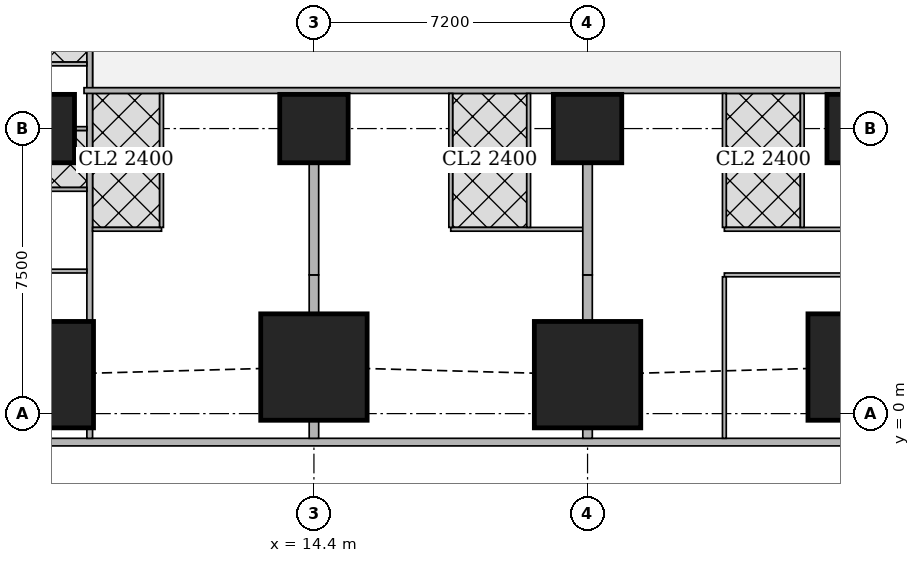
"""IFC4 building model, lengths in metres.
Left out: names, types, materials, properties, quantities, classifications, styles, units other than length and angle.
Written with IfcOpenShell. Run it as: python <this file> out.ifc"""

import sys

from ifc_helpers import new_model, si_unit, direction, frame, frame_2d, origin, origin_2d, place, context, subcontext, project, spatial, rectangle, extrude, element, fill, save


model = new_model("IFC4")
c1 = context("Model", 3, precision=1e-05, world=origin(), true_north=direction((0.0, 1.0)))
c2 = subcontext(c1, "Body", "Model", "MODEL_VIEW")
j1 = project(units=[si_unit("LENGTHUNIT", "METRE"), si_unit("PLANEANGLEUNIT", "RADIAN")], contexts=[c1])
p1 = place(None, origin())
s1 = spatial("IfcSite", under=j1, at=p1, CompositionType="ELEMENT")
p2 = place(p1, origin())
s2 = spatial("IfcBuilding", under=s1, at=p2, CompositionType="ELEMENT")
p3 = place(p2, frame((0.0, 0.0, 42.5)))
s3 = spatial("IfcBuildingStorey", under=s2, at=p3, CompositionType="ELEMENT", Elevation=42.5)
for number, where, z_axis, x_axis in (
    (1, (7.2, 1.025, 0.0), (0.0, 0.0, 1.0), (1.0, 0.0, 0.0)),
    (2, (14.4, 1.225, 0.0), (0.0, 0.0, 1.0), (1.0, 0.0, 0.0)),
    (3, (21.6, 1.025, 0.0), (0.0, 0.0, 1.0), (1.0, 0.0, 0.0)),
    (4, (28.8, 1.225, 0.0), (0.0, 0.0, 1.0), (1.0, 0.0, 0.0)),
):
    element("IfcColumn", number, at=place(p3, frame(where, z_axis=z_axis, x_axis=x_axis)), inside=s3, PredefinedType="COLUMN", context=c2, shape_type="SweptSolid", body=[
        extrude(rectangle(XDim=2.8, YDim=2.8, at=origin_2d()), origin(), (0.0, 0.0, 1.0), 3.75),
    ])
for number, where, z_axis, x_axis in (
    (5, (7.2, 7.5, 0.0), (0.0, 0.0, 1.0), (1.0, 0.0, 0.0)),
    (6, (14.4, 7.5, 0.0), (0.0, 0.0, 1.0), (1.0, 0.0, 0.0)),
    (7, (21.6, 7.5, 0.0), (0.0, 0.0, 1.0), (1.0, 0.0, 0.0)),
    (8, (28.8, 7.5, 0.0), (0.0, 0.0, 1.0), (1.0, 0.0, 0.0)),
):
    element("IfcColumn", number, at=place(p3, frame(where, z_axis=z_axis, x_axis=x_axis)), inside=s3, PredefinedType="COLUMN", context=c2, shape_type="SweptSolid", body=[
        extrude(rectangle(XDim=1.8, YDim=1.8, at=origin_2d()), origin(), (0.0, 0.0, 1.0), 3.75),
    ])
p4 = place(p3, frame((2.163, -0.75, 0.0), z_axis=(0.0, 0.0, 1.0), x_axis=(1.0, 0.0, 0.0)))
e9 = element("IfcWall", 9, at=p4, inside=s3, PredefinedType="SOLIDWALL", context=c2, shape_type="SweptSolid", body=[
    extrude(rectangle(XDim=45.628, YDim=0.2, at=frame_2d((22.814, 0.0))), origin(), (0.0, 0.0, 1.0), 3.5),
])
p5 = place(p4, frame((9.537, 0.0, 0.9)))
e10 = element("IfcOpeningElement", 10, at=p5, cuts=e9, PredefinedType="OPENING", context=c2, shape_type="SweptSolid", body=[
    extrude(rectangle(XDim=1.8, YDim=1.5, at=frame_2d((0.9, 0.75))), frame((0.0, 0.11, 0.0), z_axis=(0.0, -1.0, 0.0), x_axis=(1.0, 0.0, 0.0)), (0.0, 0.0, 1.0), 0.22),
])
p6 = place(p4, frame((13.137, 0.0, 0.9)))
e11 = element("IfcOpeningElement", 11, at=p6, cuts=e9, PredefinedType="OPENING", context=c2, shape_type="SweptSolid", body=[
    extrude(rectangle(XDim=1.8, YDim=1.5, at=frame_2d((0.9, 0.75))), frame((0.0, 0.11, 0.0), z_axis=(0.0, -1.0, 0.0), x_axis=(1.0, 0.0, 0.0)), (0.0, 0.0, 1.0), 0.22),
])
p7 = place(p4, frame((16.737, 0.0, 0.9)))
e12 = element("IfcOpeningElement", 12, at=p7, cuts=e9, PredefinedType="OPENING", context=c2, shape_type="SweptSolid", body=[
    extrude(rectangle(XDim=1.8, YDim=1.5, at=frame_2d((0.9, 0.75))), frame((0.0, 0.11, 0.0), z_axis=(0.0, -1.0, 0.0), x_axis=(1.0, 0.0, 0.0)), (0.0, 0.0, 1.0), 0.22),
])
p8 = place(p4, frame((20.337, 0.0, 0.9)))
e13 = element("IfcOpeningElement", 13, at=p8, cuts=e9, PredefinedType="OPENING", context=c2, shape_type="SweptSolid", body=[
    extrude(rectangle(XDim=1.8, YDim=1.5, at=frame_2d((0.9, 0.75))), frame((0.0, 0.11, 0.0), z_axis=(0.0, -1.0, 0.0), x_axis=(1.0, 0.0, 0.0)), (0.0, 0.0, 1.0), 0.22),
])
p9 = place(p4, frame((23.937, 0.0, 0.9)))
e14 = element("IfcOpeningElement", 14, at=p9, cuts=e9, PredefinedType="OPENING", context=c2, shape_type="SweptSolid", body=[
    extrude(rectangle(XDim=1.8, YDim=1.5, at=frame_2d((0.9, 0.75))), frame((0.0, 0.11, 0.0), z_axis=(0.0, -1.0, 0.0), x_axis=(1.0, 0.0, 0.0)), (0.0, 0.0, 1.0), 0.22),
])
p10 = place(p4, frame((27.537, 0.0, 0.9)))
e15 = element("IfcOpeningElement", 15, at=p10, cuts=e9, PredefinedType="OPENING", context=c2, shape_type="SweptSolid", body=[
    extrude(rectangle(XDim=1.8, YDim=1.5, at=frame_2d((0.9, 0.75))), frame((0.0, 0.11, 0.0), z_axis=(0.0, -1.0, 0.0), x_axis=(1.0, 0.0, 0.0)), (0.0, 0.0, 1.0), 0.22),
])
p11 = place(p4, frame((31.137, 0.0, 0.9)))
e16 = element("IfcOpeningElement", 16, at=p11, cuts=e9, PredefinedType="OPENING", context=c2, shape_type="SweptSolid", body=[
    extrude(rectangle(XDim=1.8, YDim=1.5, at=frame_2d((0.9, 0.75))), frame((0.0, 0.11, 0.0), z_axis=(0.0, -1.0, 0.0), x_axis=(1.0, 0.0, 0.0)), (0.0, 0.0, 1.0), 0.22),
])
p12 = place(p4, frame((34.737, 0.0, 0.9)))
e17 = element("IfcOpeningElement", 17, at=p12, cuts=e9, PredefinedType="OPENING", context=c2, shape_type="SweptSolid", body=[
    extrude(rectangle(XDim=1.8, YDim=1.5, at=frame_2d((0.9, 0.75))), frame((0.0, 0.11, 0.0), z_axis=(0.0, -1.0, 0.0), x_axis=(1.0, 0.0, 0.0)), (0.0, 0.0, 1.0), 0.22),
])
p13 = place(p3, frame((8.5, -0.65, 0.0), z_axis=(0.0, 0.0, 1.0), x_axis=(0.0, 1.0, 0.0)))
e18 = element("IfcWall", 18, at=p13, inside=s3, PredefinedType="SOLIDWALL", context=c2, shape_type="SweptSolid", body=[
    extrude(rectangle(XDim=0.274, YDim=0.15, at=frame_2d((0.137, 0.0))), origin(), (0.0, 0.0, 1.0), 3.5),
])
p14 = place(p3, frame((8.5, 2.426, 0.0), z_axis=(0.0, 0.0, 1.0), x_axis=(0.0, 1.0, 0.0)))
e19 = element("IfcWall", 19, at=p14, inside=s3, PredefinedType="SOLIDWALL", context=c2, shape_type="SweptSolid", body=[
    extrude(rectangle(XDim=40.173, YDim=0.15, at=frame_2d((20.086, 0.0))), origin(), (0.0, 0.0, 1.0), 3.5),
])
p15 = place(p14, frame((9.986, 0.0, 0.0)))
e20 = element("IfcOpeningElement", 20, at=p15, cuts=e19, PredefinedType="OPENING", context=c2, shape_type="SweptSolid", body=[
    extrude(rectangle(XDim=1.0, YDim=2.1, at=frame_2d((0.5, 1.05))), frame((0.0, 0.085, 0.0), z_axis=(0.0, -1.0, 0.0), x_axis=(1.0, 0.0, 0.0)), (0.0, 0.0, 1.0), 0.17),
])
p16 = place(p14, frame((14.161, 0.0, 0.0)))
e21 = element("IfcOpeningElement", 21, at=p16, cuts=e19, PredefinedType="OPENING", context=c2, shape_type="SweptSolid", body=[
    extrude(rectangle(XDim=1.0, YDim=2.1, at=frame_2d((0.5, 1.05))), frame((0.0, 0.085, 0.0), z_axis=(0.0, -1.0, 0.0), x_axis=(1.0, 0.0, 0.0)), (0.0, 0.0, 1.0), 0.17),
])
p17 = place(p14, frame((21.662, 0.0, 0.0)))
e22 = element("IfcOpeningElement", 22, at=p17, cuts=e19, PredefinedType="OPENING", context=c2, shape_type="SweptSolid", body=[
    extrude(rectangle(XDim=1.0, YDim=2.1, at=frame_2d((0.5, 1.05))), frame((0.0, 0.085, 0.0), z_axis=(0.0, -1.0, 0.0), x_axis=(1.0, 0.0, 0.0)), (0.0, 0.0, 1.0), 0.17),
])
p18 = place(p14, frame((29.161, 0.0, 0.0)))
e23 = element("IfcOpeningElement", 23, at=p18, cuts=e19, PredefinedType="OPENING", context=c2, shape_type="SweptSolid", body=[
    extrude(rectangle(XDim=1.0, YDim=2.1, at=frame_2d((0.5, 1.05))), frame((0.0, 0.085, 0.0), z_axis=(0.0, -1.0, 0.0), x_axis=(1.0, 0.0, 0.0)), (0.0, 0.0, 1.0), 0.17),
])
p19 = place(p3, frame((40.054, 8.5, 0.0), z_axis=(0.0, 0.0, 1.0), x_axis=(-1.0, 0.0, 0.0)))
e24 = element("IfcWall", 24, at=p19, inside=s3, PredefinedType="SOLIDWALL", context=c2, shape_type="SweptSolid", body=[
    extrude(rectangle(XDim=31.704, YDim=0.15, at=frame_2d((15.852, 0.0))), origin(), (0.0, 0.0, 1.0), 3.5),
])
p20 = place(p19, frame((27.321, 0.0, 0.0)))
e25 = element("IfcOpeningElement", 25, at=p20, cuts=e24, PredefinedType="OPENING", context=c2, shape_type="SweptSolid", body=[
    extrude(rectangle(XDim=1.0, YDim=2.1, at=frame_2d((0.5, 1.05))), frame((0.0, 0.085, 0.0), z_axis=(0.0, -1.0, 0.0), x_axis=(1.0, 0.0, 0.0)), (0.0, 0.0, 1.0), 0.17),
])
p21 = place(p19, frame((23.054, 0.0, 0.0)))
e26 = element("IfcOpeningElement", 26, at=p21, cuts=e24, PredefinedType="OPENING", context=c2, shape_type="SweptSolid", body=[
    extrude(rectangle(XDim=1.0, YDim=2.1, at=frame_2d((0.5, 1.05))), frame((0.0, 0.085, 0.0), z_axis=(0.0, -1.0, 0.0), x_axis=(1.0, 0.0, 0.0)), (0.0, 0.0, 1.0), 0.17),
])
p22 = place(p19, frame((15.854, 0.0, 0.0)))
e27 = element("IfcOpeningElement", 27, at=p22, cuts=e24, PredefinedType="OPENING", context=c2, shape_type="SweptSolid", body=[
    extrude(rectangle(XDim=1.0, YDim=2.1, at=frame_2d((0.5, 1.05))), frame((0.0, 0.085, 0.0), z_axis=(0.0, -1.0, 0.0), x_axis=(1.0, 0.0, 0.0)), (0.0, 0.0, 1.0), 0.17),
])
p23 = place(p19, frame((8.654, 0.0, 0.0)))
e28 = element("IfcOpeningElement", 28, at=p23, cuts=e24, PredefinedType="OPENING", context=c2, shape_type="SweptSolid", body=[
    extrude(rectangle(XDim=1.0, YDim=2.1, at=frame_2d((0.5, 1.05))), frame((0.0, 0.085, 0.0), z_axis=(0.0, -1.0, 0.0), x_axis=(1.0, 0.0, 0.0)), (0.0, 0.0, 1.0), 0.17),
])
p24 = place(p19, frame((0.15, 0.0, 0.0)))
e29 = element("IfcOpeningElement", 29, at=p24, cuts=e24, PredefinedType="OPENING", context=c2, shape_type="SweptSolid", body=[
    extrude(rectangle(XDim=1.0, YDim=2.1, at=frame_2d((0.5, 1.05))), frame((0.0, 0.085, 0.0), z_axis=(0.0, -1.0, 0.0), x_axis=(1.0, 0.0, 0.0)), (0.0, 0.0, 1.0), 0.17),
])
p25 = place(p3, frame((4.9, 3.75, 0.0), z_axis=(0.0, 0.0, 1.0), x_axis=(1.0, 0.0, 0.0)))
e30 = element("IfcWall", 30, at=p25, inside=s3, PredefinedType="PARTITIONING", context=c2, shape_type="SweptSolid", body=[
    extrude(rectangle(XDim=3.525, YDim=0.1, at=frame_2d((1.763, 0.0))), origin(), (0.0, 0.0, 1.0), 3.5),
])
p26 = place(p3, frame((8.101, 7.5, 0.0), z_axis=(0.0, 0.0, 1.0), x_axis=(1.0, 0.0, 0.0)))
e31 = element("IfcWall", 31, at=p26, inside=s3, PredefinedType="PARTITIONING", context=c2, shape_type="SweptSolid", body=[
    extrude(rectangle(XDim=0.324, YDim=0.1, at=frame_2d((0.162, 0.0))), origin(), (0.0, 0.0, 1.0), 3.5),
])
for number, where, z_axis, x_axis in (
    (32, (4.9, 9.2, 0.0), (0.0, 0.0, 1.0), (1.0, 0.0, 0.0)),
    (33, (4.9, 5.9, 0.0), (0.0, 0.0, 1.0), (1.0, 0.0, 0.0)),
):
    element("IfcWall", number, at=place(p3, frame(where, z_axis=z_axis, x_axis=x_axis)), inside=s3, PredefinedType="PARTITIONING", context=c2, shape_type="SweptSolid", body=[
        extrude(rectangle(XDim=3.525, YDim=0.1, at=frame_2d((1.763, 0.0))), origin(), (0.0, 0.0, 1.0), 3.5),
    ])
p27 = place(p3, frame((10.39, 4.85, 0.0), z_axis=(0.0, 0.0, 1.0), x_axis=(-1.0, 0.0, 0.0)))
e34 = element("IfcWall", 34, at=p27, inside=s3, PredefinedType="PARTITIONING", context=c2, shape_type="SweptSolid", body=[
    extrude(rectangle(XDim=1.815, YDim=0.1, at=frame_2d((0.907, 0.0))), origin(), (0.0, 0.0, 1.0), 3.5),
])
p28 = place(p27, frame((0.49, 0.0, 0.0)))
e35 = element("IfcOpeningElement", 35, at=p28, cuts=e34, PredefinedType="OPENING", context=c2, shape_type="SweptSolid", body=[
    extrude(rectangle(XDim=0.9, YDim=2.1, at=frame_2d((0.45, 1.05))), frame((0.0, 0.06, 0.0), z_axis=(0.0, -1.0, 0.0), x_axis=(1.0, 0.0, 0.0)), (0.0, 0.0, 1.0), 0.12),
])
p29 = place(p3, frame((10.39, 4.9, 0.0), z_axis=(0.0, 0.0, 1.0), x_axis=(0.0, 1.0, 0.0)))
e36 = element("IfcWall", 36, at=p29, inside=s3, PredefinedType="PARTITIONING", context=c2, shape_type="SweptSolid", body=[
    extrude(rectangle(XDim=3.525, YDim=0.1, at=frame_2d((1.763, 0.0))), origin(), (0.0, 0.0, 1.0), 3.5),
])
p30 = place(p3, frame((21.475, 4.85, 0.0), z_axis=(0.0, 0.0, 1.0), x_axis=(-1.0, 0.0, 0.0)))
e37 = element("IfcWall", 37, at=p30, inside=s3, PredefinedType="PARTITIONING", context=c2, shape_type="SweptSolid", body=[
    extrude(rectangle(XDim=3.475, YDim=0.1, at=frame_2d((1.738, 0.0))), origin(), (0.0, 0.0, 1.0), 3.5),
])
p31 = place(p30, frame((2.0, 0.0, 0.0)))
e38 = element("IfcOpeningElement", 38, at=p31, cuts=e37, PredefinedType="OPENING", context=c2, shape_type="SweptSolid", body=[
    extrude(rectangle(XDim=0.9, YDim=2.1, at=frame_2d((0.45, 1.05))), frame((0.0, 0.06, 0.0), z_axis=(0.0, -1.0, 0.0), x_axis=(1.0, 0.0, 0.0)), (0.0, 0.0, 1.0), 0.12),
])
p32 = place(p30, frame((0.2, 0.0, 0.0)))
e39 = element("IfcOpeningElement", 39, at=p32, cuts=e37, PredefinedType="OPENING", context=c2, shape_type="SweptSolid", body=[
    extrude(rectangle(XDim=0.9, YDim=2.1, at=frame_2d((0.45, 1.05))), frame((0.0, 0.06, 0.0), z_axis=(0.0, -1.0, 0.0), x_axis=(1.0, 0.0, 0.0)), (0.0, 0.0, 1.0), 0.12),
])
for number, where, z_axis, x_axis in (
    (40, (18.0, 4.9, 0.0), (0.0, 0.0, 1.0), (0.0, 1.0, 0.0)),
    (41, (20.05, 4.9, 0.0), (0.0, 0.0, 1.0), (0.0, 1.0, 0.0)),
):
    element("IfcWall", number, at=place(p3, frame(where, z_axis=z_axis, x_axis=x_axis)), inside=s3, PredefinedType="PARTITIONING", context=c2, shape_type="SweptSolid", body=[
        extrude(rectangle(XDim=3.525, YDim=0.1, at=frame_2d((1.763, 0.0))), origin(), (0.0, 0.0, 1.0), 3.5),
    ])
p33 = place(p3, frame((14.4, -0.65, 0.0), z_axis=(0.0, 0.0, 1.0), x_axis=(0.0, 1.0, 0.0)))
e42 = element("IfcWall", 42, at=p33, inside=s3, PredefinedType="SOLIDWALL", context=c2, shape_type="SweptSolid", body=[
    extrude(rectangle(XDim=0.474, YDim=0.25, at=frame_2d((0.237, 0.0))), origin(), (0.0, 0.0, 1.0), 3.5),
])
p34 = place(p3, frame((14.4, 2.626, 0.0), z_axis=(0.0, 0.0, 1.0), x_axis=(0.0, 1.0, 0.0)))
e43 = element("IfcWall", 43, at=p34, inside=s3, PredefinedType="SOLIDWALL", context=c2, shape_type="SweptSolid", body=[
    extrude(rectangle(XDim=1.024, YDim=0.25, at=frame_2d((0.512, 0.0))), origin(), (0.0, 0.0, 1.0), 3.5),
])
p35 = place(p3, frame((14.4, 3.65, 0.0), z_axis=(0.0, 0.0, 1.0), x_axis=(0.0, 1.0, 0.0)))
e44 = element("IfcWall", 44, at=p35, inside=s3, PredefinedType="SOLIDWALL", context=c2, shape_type="SweptSolid", body=[
    extrude(rectangle(XDim=2.949, YDim=0.25, at=frame_2d((1.475, 0.0))), origin(), (0.0, 0.0, 1.0), 3.5),
])
p36 = place(p3, frame((28.675, 3.65, 0.0), z_axis=(0.0, 0.0, 1.0), x_axis=(-1.0, 0.0, 0.0)))
e45 = element("IfcWall", 45, at=p36, inside=s3, PredefinedType="PARTITIONING", context=c2, shape_type="SweptSolid", body=[
    extrude(rectangle(XDim=3.475, YDim=0.1, at=frame_2d((1.738, 0.0))), origin(), (0.0, 0.0, 1.0), 3.5),
])
p37 = place(p36, frame((2.375, 0.0, 0.0)))
e46 = element("IfcOpeningElement", 46, at=p37, cuts=e45, PredefinedType="OPENING", context=c2, shape_type="SweptSolid", body=[
    extrude(rectangle(XDim=0.9, YDim=2.1, at=frame_2d((0.45, 1.05))), frame((0.0, 0.06, 0.0), z_axis=(0.0, -1.0, 0.0), x_axis=(1.0, 0.0, 0.0)), (0.0, 0.0, 1.0), 0.12),
])
p38 = place(p3, frame((28.675, 4.85, 0.0), z_axis=(0.0, 0.0, 1.0), x_axis=(-1.0, 0.0, 0.0)))
e47 = element("IfcWall", 47, at=p38, inside=s3, PredefinedType="PARTITIONING", context=c2, shape_type="SweptSolid", body=[
    extrude(rectangle(XDim=3.475, YDim=0.1, at=frame_2d((1.738, 0.0))), origin(), (0.0, 0.0, 1.0), 3.5),
])
p39 = place(p38, frame((2.0, 0.0, 0.0)))
e48 = element("IfcOpeningElement", 48, at=p39, cuts=e47, PredefinedType="OPENING", context=c2, shape_type="SweptSolid", body=[
    extrude(rectangle(XDim=0.9, YDim=2.1, at=frame_2d((0.45, 1.05))), frame((0.0, 0.06, 0.0), z_axis=(0.0, -1.0, 0.0), x_axis=(1.0, 0.0, 0.0)), (0.0, 0.0, 1.0), 0.12),
])
p40 = place(p38, frame((0.2, 0.0, 0.0)))
e49 = element("IfcOpeningElement", 49, at=p40, cuts=e47, PredefinedType="OPENING", context=c2, shape_type="SweptSolid", body=[
    extrude(rectangle(XDim=0.9, YDim=2.1, at=frame_2d((0.45, 1.05))), frame((0.0, 0.06, 0.0), z_axis=(0.0, -1.0, 0.0), x_axis=(1.0, 0.0, 0.0)), (0.0, 0.0, 1.0), 0.12),
])
p41 = place(p3, frame((25.2, -0.65, 0.0), z_axis=(0.0, 0.0, 1.0), x_axis=(0.0, 1.0, 0.0)))
e50 = element("IfcWall", 50, at=p41, inside=s3, PredefinedType="PARTITIONING", context=c2, shape_type="SweptSolid", body=[
    extrude(rectangle(XDim=4.25, YDim=0.1, at=frame_2d((2.125, 0.0))), origin(), (0.0, 0.0, 1.0), 2.05),
])
for number, where, z_axis, x_axis in (
    (51, (25.2, 4.9, 0.0), (0.0, 0.0, 1.0), (0.0, 1.0, 0.0)),
    (52, (27.25, 4.9, 0.0), (0.0, 0.0, 1.0), (0.0, 1.0, 0.0)),
):
    element("IfcWall", number, at=place(p3, frame(where, z_axis=z_axis, x_axis=x_axis)), inside=s3, PredefinedType="PARTITIONING", context=c2, shape_type="SweptSolid", body=[
        extrude(rectangle(XDim=3.525, YDim=0.1, at=frame_2d((1.763, 0.0))), origin(), (0.0, 0.0, 1.0), 3.5),
    ])
p42 = place(p3, frame((21.6, -0.65, 0.0), z_axis=(0.0, 0.0, 1.0), x_axis=(0.0, 1.0, 0.0)))
e53 = element("IfcWall", 53, at=p42, inside=s3, PredefinedType="SOLIDWALL", context=c2, shape_type="SweptSolid", body=[
    extrude(rectangle(XDim=0.274, YDim=0.25, at=frame_2d((0.137, 0.0))), origin(), (0.0, 0.0, 1.0), 3.5),
])
p43 = place(p3, frame((21.6, 2.426, 0.0), z_axis=(0.0, 0.0, 1.0), x_axis=(0.0, 1.0, 0.0)))
e54 = element("IfcWall", 54, at=p43, inside=s3, PredefinedType="SOLIDWALL", context=c2, shape_type="SweptSolid", body=[
    extrude(rectangle(XDim=1.224, YDim=0.25, at=frame_2d((0.612, 0.0))), origin(), (0.0, 0.0, 1.0), 3.5),
])
p44 = place(p3, frame((21.6, 3.65, 0.0), z_axis=(0.0, 0.0, 1.0), x_axis=(0.0, 1.0, 0.0)))
e55 = element("IfcWall", 55, at=p44, inside=s3, PredefinedType="SOLIDWALL", context=c2, shape_type="SweptSolid", body=[
    extrude(rectangle(XDim=2.949, YDim=0.25, at=frame_2d((1.475, 0.0))), origin(), (0.0, 0.0, 1.0), 3.5),
])
p45 = place(p5, origin())
e56 = element("IfcWindow", 56, at=p45, inside=s3, PartitioningType="SINGLE_PANEL", PredefinedType="WINDOW", context=c2, shape_type="SweptSolid", body=[
    extrude(rectangle(XDim=1.8, YDim=1.5, at=frame_2d((0.9, 0.75))), frame((0.0, 0.03, 0.0), z_axis=(0.0, -1.0, 0.0), x_axis=(1.0, 0.0, 0.0)), (0.0, 0.0, 1.0), 0.06),
])
fill(e10, e56)
p46 = place(p6, origin())
e57 = element("IfcWindow", 57, at=p46, inside=s3, PartitioningType="SINGLE_PANEL", PredefinedType="WINDOW", context=c2, shape_type="SweptSolid", body=[
    extrude(rectangle(XDim=1.8, YDim=1.5, at=frame_2d((0.9, 0.75))), frame((0.0, 0.03, 0.0), z_axis=(0.0, -1.0, 0.0), x_axis=(1.0, 0.0, 0.0)), (0.0, 0.0, 1.0), 0.06),
])
fill(e11, e57)
p47 = place(p7, origin())
e58 = element("IfcWindow", 58, at=p47, inside=s3, PartitioningType="SINGLE_PANEL", PredefinedType="WINDOW", context=c2, shape_type="SweptSolid", body=[
    extrude(rectangle(XDim=1.8, YDim=1.5, at=frame_2d((0.9, 0.75))), frame((0.0, 0.03, 0.0), z_axis=(0.0, -1.0, 0.0), x_axis=(1.0, 0.0, 0.0)), (0.0, 0.0, 1.0), 0.06),
])
fill(e12, e58)
p48 = place(p8, origin())
e59 = element("IfcWindow", 59, at=p48, inside=s3, PartitioningType="SINGLE_PANEL", PredefinedType="WINDOW", context=c2, shape_type="SweptSolid", body=[
    extrude(rectangle(XDim=1.8, YDim=1.5, at=frame_2d((0.9, 0.75))), frame((0.0, 0.03, 0.0), z_axis=(0.0, -1.0, 0.0), x_axis=(1.0, 0.0, 0.0)), (0.0, 0.0, 1.0), 0.06),
])
fill(e13, e59)
p49 = place(p9, origin())
e60 = element("IfcWindow", 60, at=p49, inside=s3, PartitioningType="SINGLE_PANEL", PredefinedType="WINDOW", context=c2, shape_type="SweptSolid", body=[
    extrude(rectangle(XDim=1.8, YDim=1.5, at=frame_2d((0.9, 0.75))), frame((0.0, 0.03, 0.0), z_axis=(0.0, -1.0, 0.0), x_axis=(1.0, 0.0, 0.0)), (0.0, 0.0, 1.0), 0.06),
])
fill(e14, e60)
p50 = place(p28, origin())
e61 = element("IfcDoor", 61, at=p50, inside=s3, OperationType="SINGLE_SWING_LEFT", PredefinedType="DOOR", context=c2, shape_type="SweptSolid", body=[
    extrude(rectangle(XDim=0.9, YDim=2.1, at=frame_2d((0.45, 1.05))), frame((0.0, 0.025, 0.0), z_axis=(0.0, -1.0, 0.0), x_axis=(1.0, 0.0, 0.0)), (0.0, 0.0, 1.0), 0.05),
])
fill(e35, e61)
p51 = place(p20, origin())
e62 = element("IfcDoor", 62, at=p51, inside=s3, OperationType="SINGLE_SWING_LEFT", PredefinedType="DOOR", context=c2, shape_type="SweptSolid", body=[
    extrude(rectangle(XDim=1.0, YDim=2.1, at=frame_2d((0.5, 1.05))), frame((0.0, 0.025, 0.0), z_axis=(0.0, -1.0, 0.0), x_axis=(1.0, 0.0, 0.0)), (0.0, 0.0, 1.0), 0.05),
])
fill(e25, e62)
p52 = place(p31, origin())
e63 = element("IfcDoor", 63, at=p52, inside=s3, OperationType="SINGLE_SWING_LEFT", PredefinedType="DOOR", context=c2, shape_type="SweptSolid", body=[
    extrude(rectangle(XDim=0.9, YDim=2.1, at=frame_2d((0.45, 1.05))), frame((0.0, 0.025, 0.0), z_axis=(0.0, -1.0, 0.0), x_axis=(1.0, 0.0, 0.0)), (0.0, 0.0, 1.0), 0.05),
])
fill(e38, e63)
p53 = place(p32, origin())
e64 = element("IfcDoor", 64, at=p53, inside=s3, OperationType="SINGLE_SWING_RIGHT", PredefinedType="DOOR", context=c2, shape_type="SweptSolid", body=[
    extrude(rectangle(XDim=0.9, YDim=2.1, at=frame_2d((0.45, 1.05))), frame((0.0, 0.025, 0.0), z_axis=(0.0, -1.0, 0.0), x_axis=(1.0, 0.0, 0.0)), (0.0, 0.0, 1.0), 0.05),
])
fill(e39, e64)
p54 = place(p21, origin())
e65 = element("IfcDoor", 65, at=p54, inside=s3, OperationType="SINGLE_SWING_LEFT", PredefinedType="DOOR", context=c2, shape_type="SweptSolid", body=[
    extrude(rectangle(XDim=1.0, YDim=2.1, at=frame_2d((0.5, 1.05))), frame((0.0, 0.025, 0.0), z_axis=(0.0, -1.0, 0.0), x_axis=(1.0, 0.0, 0.0)), (0.0, 0.0, 1.0), 0.05),
])
fill(e26, e65)
p55 = place(p37, origin())
e66 = element("IfcDoor", 66, at=p55, inside=s3, OperationType="SINGLE_SWING_RIGHT", PredefinedType="DOOR", context=c2, shape_type="SweptSolid", body=[
    extrude(rectangle(XDim=0.9, YDim=2.1, at=frame_2d((0.45, 1.05))), frame((0.0, 0.025, 0.0), z_axis=(0.0, -1.0, 0.0), x_axis=(1.0, 0.0, 0.0)), (0.0, 0.0, 1.0), 0.05),
])
fill(e46, e66)
p56 = place(p39, origin())
e67 = element("IfcDoor", 67, at=p56, inside=s3, OperationType="SINGLE_SWING_LEFT", PredefinedType="DOOR", context=c2, shape_type="SweptSolid", body=[
    extrude(rectangle(XDim=0.9, YDim=2.1, at=frame_2d((0.45, 1.05))), frame((0.0, 0.025, 0.0), z_axis=(0.0, -1.0, 0.0), x_axis=(1.0, 0.0, 0.0)), (0.0, 0.0, 1.0), 0.05),
])
fill(e48, e67)
p57 = place(p40, origin())
e68 = element("IfcDoor", 68, at=p57, inside=s3, OperationType="SINGLE_SWING_RIGHT", PredefinedType="DOOR", context=c2, shape_type="SweptSolid", body=[
    extrude(rectangle(XDim=0.9, YDim=2.1, at=frame_2d((0.45, 1.05))), frame((0.0, 0.025, 0.0), z_axis=(0.0, -1.0, 0.0), x_axis=(1.0, 0.0, 0.0)), (0.0, 0.0, 1.0), 0.05),
])
fill(e49, e68)
p58 = place(p22, origin())
e69 = element("IfcDoor", 69, at=p58, inside=s3, OperationType="SINGLE_SWING_LEFT", PredefinedType="DOOR", context=c2, shape_type="SweptSolid", body=[
    extrude(rectangle(XDim=1.0, YDim=2.1, at=frame_2d((0.5, 1.05))), frame((0.0, 0.025, 0.0), z_axis=(0.0, -1.0, 0.0), x_axis=(1.0, 0.0, 0.0)), (0.0, 0.0, 1.0), 0.05),
])
fill(e27, e69)
save(model, sys.argv[1])
